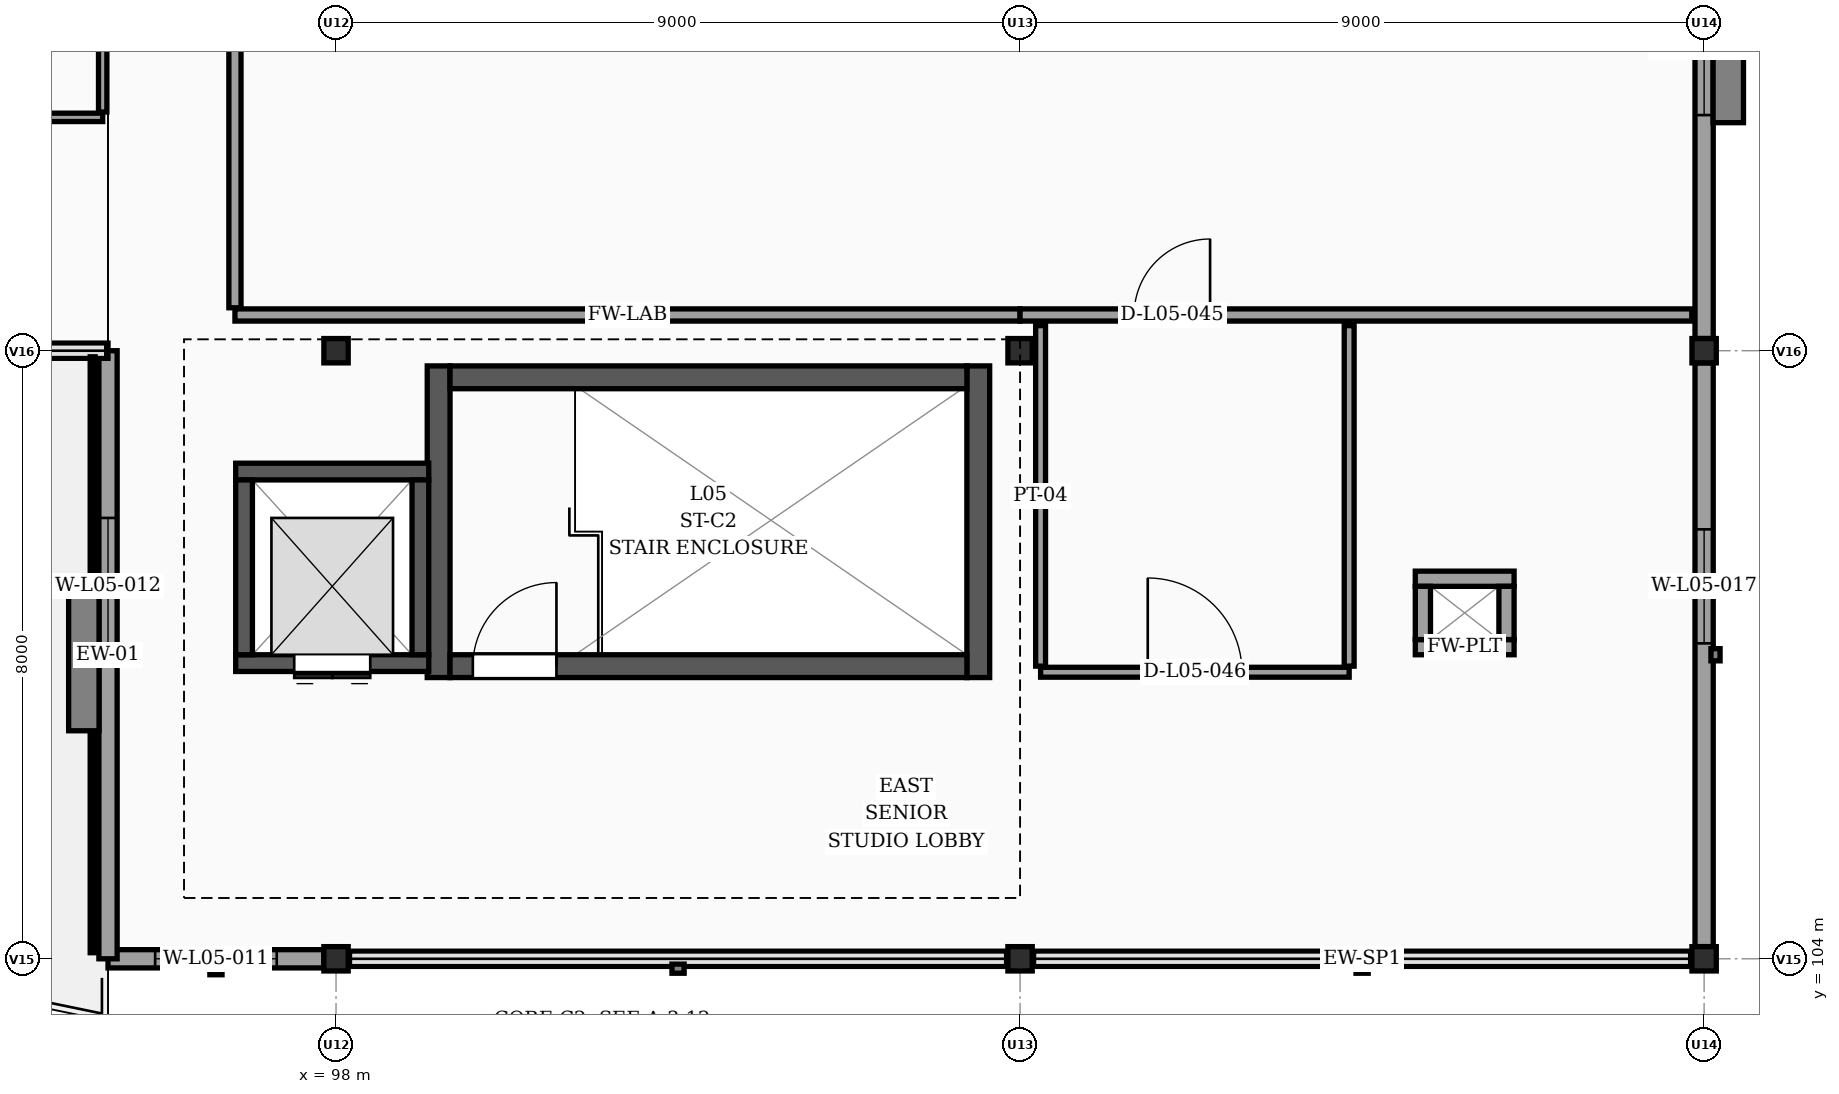
"""IFC4 building model, lengths in metres.
Left out: names, types, materials, properties, quantities, classifications, styles, units other than length and angle.
Written with IfcOpenShell. Run it as: python <this file> out.ifc"""

import sys

from ifc_helpers import new_model, si_unit, direction, frame, frame_2d, origin, origin_2d, place, context, subcontext, project, spatial, rectangle, extrude, element, fill, save


model = new_model("IFC4")
c1 = context("Model", 3, precision=1e-05, world=origin(), true_north=direction((0.0, 1.0)))
c2 = subcontext(c1, "Body", "Model", "MODEL_VIEW")
j1 = project(units=[si_unit("LENGTHUNIT", "METRE"), si_unit("PLANEANGLEUNIT", "RADIAN")], contexts=[c1])
p1 = place(None, origin())
s1 = spatial("IfcSite", under=j1, at=p1, CompositionType="ELEMENT")
p2 = place(p1, origin())
s2 = spatial("IfcBuilding", under=s1, at=p2, CompositionType="ELEMENT")
p3 = place(p2, frame((0.0, 0.0, 20.1)))
s3 = spatial("IfcBuildingStorey", under=s2, at=p3, CompositionType="ELEMENT", Elevation=20.1)
p4 = place(p3, frame((98.0, 104.0, 0.0), z_axis=(0.0, 0.0, 1.0), x_axis=(1.0, 0.0, 0.0)))
e1 = element("IfcColumn", 1, at=p4, inside=s3, PredefinedType="COLUMN", context=c2, shape_type="SweptSolid", body=[
    extrude(rectangle(XDim=0.32, YDim=0.32, at=origin_2d()), origin(), (0.0, 0.0, 1.0), 3.482),
])
p5 = place(p3, frame((98.0, 112.0, 0.0), z_axis=(0.0, 0.0, 1.0), x_axis=(1.0, 0.0, 0.0)))
e2 = element("IfcColumn", 2, at=p5, inside=s3, PredefinedType="COLUMN", context=c2, shape_type="SweptSolid", body=[
    extrude(rectangle(XDim=0.32, YDim=0.32, at=origin_2d()), origin(), (0.0, 0.0, 1.0), 3.827),
])
p6 = place(p3, frame((107.0, 104.0, 0.0), z_axis=(0.0, 0.0, 1.0), x_axis=(1.0, 0.0, 0.0)))
e3 = element("IfcColumn", 3, at=p6, inside=s3, PredefinedType="COLUMN", context=c2, shape_type="SweptSolid", body=[
    extrude(rectangle(XDim=0.32, YDim=0.32, at=origin_2d()), origin(), (0.0, 0.0, 1.0), 3.812),
])
p7 = place(p3, frame((107.0, 112.0, 0.0), z_axis=(0.0, 0.0, 1.0), x_axis=(1.0, 0.0, 0.0)))
e4 = element("IfcColumn", 4, at=p7, inside=s3, PredefinedType="COLUMN", context=c2, shape_type="SweptSolid", body=[
    extrude(rectangle(XDim=0.32, YDim=0.32, at=origin_2d()), origin(), (0.0, 0.0, 1.0), 4.157),
])
p8 = place(p3, frame((116.0, 104.0, 0.0), z_axis=(0.0, 0.0, 1.0), x_axis=(1.0, 0.0, 0.0)))
e5 = element("IfcColumn", 5, at=p8, inside=s3, PredefinedType="COLUMN", context=c2, shape_type="SweptSolid", body=[
    extrude(rectangle(XDim=0.32, YDim=0.32, at=origin_2d()), origin(), (0.0, 0.0, 1.0), 4.142),
])
p9 = place(p3, frame((116.0, 112.0, 0.0), z_axis=(0.0, 0.0, 1.0), x_axis=(1.0, 0.0, 0.0)))
e6 = element("IfcColumn", 6, at=p9, inside=s3, PredefinedType="COLUMN", context=c2, shape_type="SweptSolid", body=[
    extrude(rectangle(XDim=0.32, YDim=0.32, at=origin_2d()), origin(), (0.0, 0.0, 1.0), 4.487),
])
for number, where, z_axis, x_axis in (
    (7, (115.84, 104.0, 0.0), (0.0, 0.0, 1.0), (-1.0, 0.0, 0.0)),
    (8, (106.84, 104.0, 0.0), (0.0, 0.0, 1.0), (-1.0, 0.0, 0.0)),
):
    element("IfcWall", number, at=place(p3, frame(where, z_axis=z_axis, x_axis=x_axis)), inside=s3, PredefinedType="SOLIDWALL", context=c2, shape_type="SweptSolid", body=[
        extrude(rectangle(XDim=8.68, YDim=0.2, at=frame_2d((4.34, 0.0))), origin(), (0.0, 0.0, 1.0), 0.95),
    ])
p10 = place(p3, frame((97.84, 104.0, 0.0), z_axis=(0.0, 0.0, 1.0), x_axis=(-1.0, 0.0, 0.0)))
e9 = element("IfcWall", 9, at=p10, inside=s3, PredefinedType="SOLIDWALL", context=c2, shape_type="SweptSolid", body=[
    extrude(rectangle(XDim=2.84, YDim=0.24, at=frame_2d((1.42, 0.0))), origin(), (0.0, 0.0, 1.0), 3.372),
])
p11 = place(p10, frame((0.62, 0.0, 0.95)))
e10 = element("IfcOpeningElement", 10, at=p11, cuts=e9, PredefinedType="OPENING", context=c2, shape_type="SweptSolid", body=[
    extrude(rectangle(XDim=1.6, YDim=1.65, at=frame_2d((0.8, 0.825))), frame((0.0, 0.13, 0.0), z_axis=(0.0, -1.0, 0.0), x_axis=(1.0, 0.0, 0.0)), (0.0, 0.0, 1.0), 0.26),
])
p12 = place(p3, frame((95.0, 104.0, 0.0), z_axis=(0.0, 0.0, 1.0), x_axis=(0.0, 1.0, 0.0)))
e11 = element("IfcWall", 11, at=p12, inside=s3, PredefinedType="SOLIDWALL", context=c2, shape_type="SweptSolid", body=[
    extrude(rectangle(XDim=8.0, YDim=0.24, at=frame_2d((4.0, 0.0))), origin(), (0.0, 0.0, 1.0), 3.372),
])
p13 = place(p12, frame((4.0, 0.0, 0.95)))
e12 = element("IfcOpeningElement", 12, at=p13, cuts=e11, PredefinedType="OPENING", context=c2, shape_type="SweptSolid", body=[
    extrude(rectangle(XDim=1.8, YDim=1.65, at=frame_2d((0.9, 0.825))), frame((0.0, 0.13, 0.0), z_axis=(0.0, -1.0, 0.0), x_axis=(1.0, 0.0, 0.0)), (0.0, 0.0, 1.0), 0.26),
])
p14 = place(p3, frame((95.0, 112.0, 0.0), z_axis=(0.0, 0.0, 1.0), x_axis=(-1.0, 0.0, 0.0)))
e13 = element("IfcWall", 13, at=p14, inside=s3, PredefinedType="SOLIDWALL", context=c2, shape_type="SweptSolid", body=[
    extrude(rectangle(XDim=5.84, YDim=0.2, at=frame_2d((2.92, 0.0))), origin(), (0.0, 0.0, 1.0), 0.95),
])
p15 = place(p3, frame((116.0, 111.84, 0.0), z_axis=(0.0, 0.0, 1.0), x_axis=(0.0, -1.0, 0.0)))
e14 = element("IfcWall", 14, at=p15, inside=s3, PredefinedType="SOLIDWALL", context=c2, shape_type="SweptSolid", body=[
    extrude(rectangle(XDim=7.68, YDim=0.24, at=frame_2d((3.84, 0.0))), origin(), (0.0, 0.0, 1.0), 3.639),
])
p16 = place(p15, frame((2.19, 0.0, 0.95)))
e15 = element("IfcOpeningElement", 15, at=p16, cuts=e14, PredefinedType="OPENING", context=c2, shape_type="SweptSolid", body=[
    extrude(rectangle(XDim=1.5, YDim=1.35, at=frame_2d((0.75, 0.675))), frame((0.0, 0.13, 0.0), z_axis=(0.0, -1.0, 0.0), x_axis=(1.0, 0.0, 0.0)), (0.0, 0.0, 1.0), 0.26),
])
p17 = place(p3, frame((116.0, 119.84, 0.0), z_axis=(0.0, 0.0, 1.0), x_axis=(0.0, -1.0, 0.0)))
e16 = element("IfcWall", 16, at=p17, inside=s3, PredefinedType="SOLIDWALL", context=c2, shape_type="SweptSolid", body=[
    extrude(rectangle(XDim=7.68, YDim=0.24, at=frame_2d((3.84, 0.0))), origin(), (0.0, 0.0, 1.0), 3.984),
])
p18 = place(p17, frame((2.94, 0.0, 0.95)))
e17 = element("IfcOpeningElement", 17, at=p18, cuts=e16, PredefinedType="OPENING", context=c2, shape_type="SweptSolid", body=[
    extrude(rectangle(XDim=1.8, YDim=1.35, at=frame_2d((0.9, 0.675))), frame((0.0, 0.13, 0.0), z_axis=(0.0, -1.0, 0.0), x_axis=(1.0, 0.0, 0.0)), (0.0, 0.0, 1.0), 0.26),
])
for number, where, z_axis, x_axis in (
    (18, (99.35, 107.7, 0.0), (0.0, 0.0, 1.0), (0.0, 1.0, 0.0)),
    (19, (106.45, 111.8, 0.0), (0.0, 0.0, 1.0), (0.0, -1.0, 0.0)),
):
    element("IfcWall", number, at=place(p3, frame(where, z_axis=z_axis, x_axis=x_axis)), inside=s3, PredefinedType="SHEAR", context=c2, shape_type="SweptSolid", body=[
        extrude(rectangle(XDim=4.1, YDim=0.3, at=frame_2d((2.05, 0.0))), origin(), (0.0, 0.0, 1.0), 3.685),
    ])
p19 = place(p3, frame((99.5, 107.85, 0.0), z_axis=(0.0, 0.0, 1.0), x_axis=(1.0, 0.0, 0.0)))
e20 = element("IfcWall", 20, at=p19, inside=s3, PredefinedType="SHEAR", context=c2, shape_type="SweptSolid", body=[
    extrude(rectangle(XDim=6.8, YDim=0.3, at=frame_2d((3.4, 0.0))), origin(), (0.0, 0.0, 1.0), 3.685),
])
p20 = place(p19, frame((0.3, 0.0, 0.0)))
e21 = element("IfcOpeningElement", 21, at=p20, cuts=e20, PredefinedType="OPENING", context=c2, shape_type="SweptSolid", body=[
    extrude(rectangle(XDim=1.1, YDim=2.15, at=frame_2d((0.55, 1.075))), frame((0.0, 0.16, 0.0), z_axis=(0.0, -1.0, 0.0), x_axis=(1.0, 0.0, 0.0)), (0.0, 0.0, 1.0), 0.32),
])
p21 = place(p3, frame((106.3, 111.65, 0.0), z_axis=(0.0, 0.0, 1.0), x_axis=(-1.0, 0.0, 0.0)))
e22 = element("IfcWall", 22, at=p21, inside=s3, PredefinedType="SHEAR", context=c2, shape_type="SweptSolid", body=[
    extrude(rectangle(XDim=6.8, YDim=0.3, at=frame_2d((3.4, 0.0))), origin(), (0.0, 0.0, 1.0), 3.685),
])
p22 = place(p3, frame((99.22, 107.89, 0.0), z_axis=(0.0, 0.0, 1.0), x_axis=(-1.0, 0.0, 0.0)))
e23 = element("IfcWall", 23, at=p22, inside=s3, PredefinedType="SHEAR", context=c2, shape_type="SweptSolid", body=[
    extrude(rectangle(XDim=2.54, YDim=0.22, at=frame_2d((1.27, 0.0))), origin(), (0.0, 0.0, 1.0), 4.5),
])
p23 = place(p22, frame((0.77, 0.0, 0.0)))
e24 = element("IfcOpeningElement", 24, at=p23, cuts=e23, PredefinedType="OPENING", context=c2, shape_type="SweptSolid", body=[
    extrude(rectangle(XDim=1.0, YDim=2.15, at=frame_2d((0.5, 1.075))), frame((0.0, 0.12, 0.0), z_axis=(0.0, -1.0, 0.0), x_axis=(1.0, 0.0, 0.0)), (0.0, 0.0, 1.0), 0.24),
])
p24 = place(p3, frame((96.68, 110.41, 0.0), z_axis=(0.0, 0.0, 1.0), x_axis=(1.0, 0.0, 0.0)))
e25 = element("IfcWall", 25, at=p24, inside=s3, PredefinedType="SHEAR", context=c2, shape_type="SweptSolid", body=[
    extrude(rectangle(XDim=2.54, YDim=0.22, at=frame_2d((1.27, 0.0))), origin(), (0.0, 0.0, 1.0), 4.5),
])
for number, where, z_axis, x_axis in (
    (26, (96.79, 108.0, 0.0), (0.0, 0.0, 1.0), (0.0, 1.0, 0.0)),
    (27, (99.11, 110.3, 0.0), (0.0, 0.0, 1.0), (0.0, -1.0, 0.0)),
):
    element("IfcWall", number, at=place(p3, frame(where, z_axis=z_axis, x_axis=x_axis)), inside=s3, PredefinedType="SHEAR", context=c2, shape_type="SweptSolid", body=[
        extrude(rectangle(XDim=2.3, YDim=0.22, at=frame_2d((1.15, 0.0))), origin(), (0.0, 0.0, 1.0), 4.5),
    ])
for number, where, z_axis, x_axis in (
    (28, (113.5, 108.1, 0.0), (0.0, 0.0, 1.0), (-1.0, 0.0, 0.0)),
    (29, (112.2, 109.0, 0.0), (0.0, 0.0, 1.0), (1.0, 0.0, 0.0)),
):
    element("IfcWall", number, at=place(p3, frame(where, z_axis=z_axis, x_axis=x_axis)), inside=s3, PredefinedType="PARTITIONING", context=c2, shape_type="SweptSolid", body=[
        extrude(rectangle(XDim=1.3, YDim=0.2, at=frame_2d((0.65, 0.0))), origin(), (0.0, 0.0, 1.0), 3.65),
    ])
for number, where, z_axis, x_axis in (
    (30, (112.3, 108.2, 0.0), (0.0, 0.0, 1.0), (0.0, 1.0, 0.0)),
    (31, (113.4, 108.9, 0.0), (0.0, 0.0, 1.0), (0.0, -1.0, 0.0)),
):
    element("IfcWall", number, at=place(p3, frame(where, z_axis=z_axis, x_axis=x_axis)), inside=s3, PredefinedType="PARTITIONING", context=c2, shape_type="SweptSolid", body=[
        extrude(rectangle(XDim=0.7, YDim=0.2, at=frame_2d((0.35, 0.0))), origin(), (0.0, 0.0, 1.0), 3.65),
    ])
p25 = place(p3, frame((89.0, 115.07, 0.0), z_axis=(0.0, 0.0, 1.0), x_axis=(1.0, 0.0, 0.0)))
e32 = element("IfcWall", 32, at=p25, inside=s3, PredefinedType="PARTITIONING", context=c2, shape_type="SweptSolid", body=[
    extrude(rectangle(XDim=5.93, YDim=0.11, at=frame_2d((2.965, 0.0))), origin(), (0.0, 0.0, 1.0), 3.65),
])
p26 = place(p3, frame((94.93, 115.14, 0.0), z_axis=(0.0, 0.0, 1.0), x_axis=(0.0, 1.0, 0.0)))
e33 = element("IfcWall", 33, at=p26, inside=s3, PredefinedType="PARTITIONING", context=c2, shape_type="SweptSolid", body=[
    extrude(rectangle(XDim=6.279, YDim=0.11, at=frame_2d((3.14, 0.0))), origin(), (0.0, 0.0, 1.0), 3.65),
])
p27 = place(p3, frame((96.67, 112.47, 0.0), z_axis=(0.0, 0.0, 1.0), x_axis=(1.0, 0.0, 0.0)))
e34 = element("IfcWall", 34, at=p27, inside=s3, PredefinedType="PARTITIONING", context=c2, shape_type="SweptSolid", body=[
    extrude(rectangle(XDim=10.33, YDim=0.16, at=frame_2d((5.165, 0.0))), origin(), (0.0, 0.0, 1.0), 3.65),
])
p28 = place(p3, frame((107.0, 112.47, 0.0), z_axis=(0.0, 0.0, 1.0), x_axis=(1.0, 0.0, 0.0)))
e35 = element("IfcWall", 35, at=p28, inside=s3, PredefinedType="PARTITIONING", context=c2, shape_type="SweptSolid", body=[
    extrude(rectangle(XDim=8.838, YDim=0.16, at=frame_2d((4.419, 0.0))), origin(), (0.0, 0.0, 1.0), 3.65),
])
p29 = place(p28, frame((1.5, 0.0, 0.0)))
e36 = element("IfcOpeningElement", 36, at=p29, cuts=e35, PredefinedType="OPENING", context=c2, shape_type="SweptSolid", body=[
    extrude(rectangle(XDim=1.0, YDim=2.15, at=frame_2d((0.5, 1.075))), frame((0.0, 0.09, 0.0), z_axis=(0.0, -1.0, 0.0), x_axis=(1.0, 0.0, 0.0)), (0.0, 0.0, 1.0), 0.18),
])
p30 = place(p3, frame((96.67, 112.565, 0.0), z_axis=(0.0, 0.0, 1.0), x_axis=(0.0, 1.0, 0.0)))
e37 = element("IfcWall", 37, at=p30, inside=s3, PredefinedType="PARTITIONING", context=c2, shape_type="SweptSolid", body=[
    extrude(rectangle(XDim=8.603, YDim=0.16, at=frame_2d((4.302, 0.0))), origin(), (0.0, 0.0, 1.0), 3.65),
])
p31 = place(p3, frame((107.27, 107.77, 0.0), z_axis=(0.0, 0.0, 1.0), x_axis=(1.0, 0.0, 0.0)))
e38 = element("IfcWall", 38, at=p31, inside=s3, PredefinedType="PARTITIONING", context=c2, shape_type="SweptSolid", body=[
    extrude(rectangle(XDim=4.06, YDim=0.13, at=frame_2d((2.03, 0.0))), origin(), (0.0, 0.0, 1.0), 3.65),
])
p32 = place(p31, frame((1.41, 0.0, 0.0)))
e39 = element("IfcOpeningElement", 39, at=p32, cuts=e38, PredefinedType="OPENING", context=c2, shape_type="SweptSolid", body=[
    extrude(rectangle(XDim=1.24, YDim=2.25, at=frame_2d((0.62, 1.125))), frame((0.0, 0.075, 0.0), z_axis=(0.0, -1.0, 0.0), x_axis=(1.0, 0.0, 0.0)), (0.0, 0.0, 1.0), 0.15),
])
for number, where, z_axis, x_axis in (
    (40, (107.27, 107.85, 0.0), (0.0, 0.0, 1.0), (0.0, 1.0, 0.0)),
    (41, (111.33, 107.85, 0.0), (0.0, 0.0, 1.0), (0.0, 1.0, 0.0)),
):
    element("IfcWall", number, at=place(p3, frame(where, z_axis=z_axis, x_axis=x_axis)), inside=s3, PredefinedType="PARTITIONING", context=c2, shape_type="SweptSolid", body=[
        extrude(rectangle(XDim=4.48, YDim=0.13, at=frame_2d((2.24, 0.0))), origin(), (0.0, 0.0, 1.0), 3.65),
    ])
p33 = place(p11, origin())
e42 = element("IfcWindow", 42, at=p33, inside=s3, PartitioningType="DOUBLE_PANEL_VERTICAL", PredefinedType="WINDOW", context=c2, shape_type="SweptSolid", body=[
    extrude(rectangle(XDim=1.6, YDim=1.65, at=frame_2d((0.8, 0.825))), frame((0.0, 0.03, 0.0), z_axis=(0.0, -1.0, 0.0), x_axis=(1.0, 0.0, 0.0)), (0.0, 0.0, 1.0), 0.06),
])
fill(e10, e42)
p34 = place(p13, origin())
e43 = element("IfcWindow", 43, at=p34, inside=s3, PartitioningType="DOUBLE_PANEL_VERTICAL", PredefinedType="WINDOW", context=c2, shape_type="SweptSolid", body=[
    extrude(rectangle(XDim=1.8, YDim=1.65, at=frame_2d((0.9, 0.825))), frame((0.0, 0.03, 0.0), z_axis=(0.0, -1.0, 0.0), x_axis=(1.0, 0.0, 0.0)), (0.0, 0.0, 1.0), 0.06),
])
fill(e12, e43)
p35 = place(p16, origin())
e44 = element("IfcWindow", 44, at=p35, inside=s3, PartitioningType="SINGLE_PANEL", PredefinedType="WINDOW", context=c2, shape_type="SweptSolid", body=[
    extrude(rectangle(XDim=1.5, YDim=1.35, at=frame_2d((0.75, 0.675))), frame((0.0, 0.03, 0.0), z_axis=(0.0, -1.0, 0.0), x_axis=(1.0, 0.0, 0.0)), (0.0, 0.0, 1.0), 0.06),
])
fill(e15, e44)
p36 = place(p18, origin())
e45 = element("IfcWindow", 45, at=p36, inside=s3, PartitioningType="DOUBLE_PANEL_VERTICAL", PredefinedType="WINDOW", context=c2, shape_type="SweptSolid", body=[
    extrude(rectangle(XDim=1.8, YDim=1.35, at=frame_2d((0.9, 0.675))), frame((0.0, 0.03, 0.0), z_axis=(0.0, -1.0, 0.0), x_axis=(1.0, 0.0, 0.0)), (0.0, 0.0, 1.0), 0.06),
])
fill(e17, e45)
p37 = place(p20, origin())
e46 = element("IfcDoor", 46, at=p37, inside=s3, OperationType="SINGLE_SWING_RIGHT", PredefinedType="DOOR", context=c2, shape_type="SweptSolid", body=[
    extrude(rectangle(XDim=1.1, YDim=2.15, at=frame_2d((0.55, 1.075))), frame((0.0, 0.025, 0.0), z_axis=(0.0, -1.0, 0.0), x_axis=(1.0, 0.0, 0.0)), (0.0, 0.0, 1.0), 0.05),
])
fill(e21, e46)
p38 = place(p23, origin())
e47 = element("IfcDoor", 47, at=p38, inside=s3, OperationType="DOUBLE_DOOR_SLIDING", PredefinedType="DOOR", context=c2, shape_type="SweptSolid", body=[
    extrude(rectangle(XDim=1.0, YDim=2.15, at=frame_2d((0.5, 1.075))), frame((0.0, 0.025, 0.0), z_axis=(0.0, -1.0, 0.0), x_axis=(1.0, 0.0, 0.0)), (0.0, 0.0, 1.0), 0.05),
])
fill(e24, e47)
p39 = place(p29, origin())
e48 = element("IfcDoor", 48, at=p39, inside=s3, OperationType="SINGLE_SWING_RIGHT", PredefinedType="DOOR", context=c2, shape_type="SweptSolid", body=[
    extrude(rectangle(XDim=1.0, YDim=2.15, at=frame_2d((0.5, 1.075))), frame((0.0, 0.025, 0.0), z_axis=(0.0, -1.0, 0.0), x_axis=(1.0, 0.0, 0.0)), (0.0, 0.0, 1.0), 0.05),
])
fill(e36, e48)
p40 = place(p32, origin())
e49 = element("IfcDoor", 49, at=p40, inside=s3, OperationType="SINGLE_SWING_LEFT", PredefinedType="DOOR", context=c2, shape_type="SweptSolid", body=[
    extrude(rectangle(XDim=1.24, YDim=2.25, at=frame_2d((0.62, 1.125))), frame((0.0, 0.025, 0.0), z_axis=(0.0, -1.0, 0.0), x_axis=(1.0, 0.0, 0.0)), (0.0, 0.0, 1.0), 0.05),
])
fill(e39, e49)
save(model, sys.argv[1])
